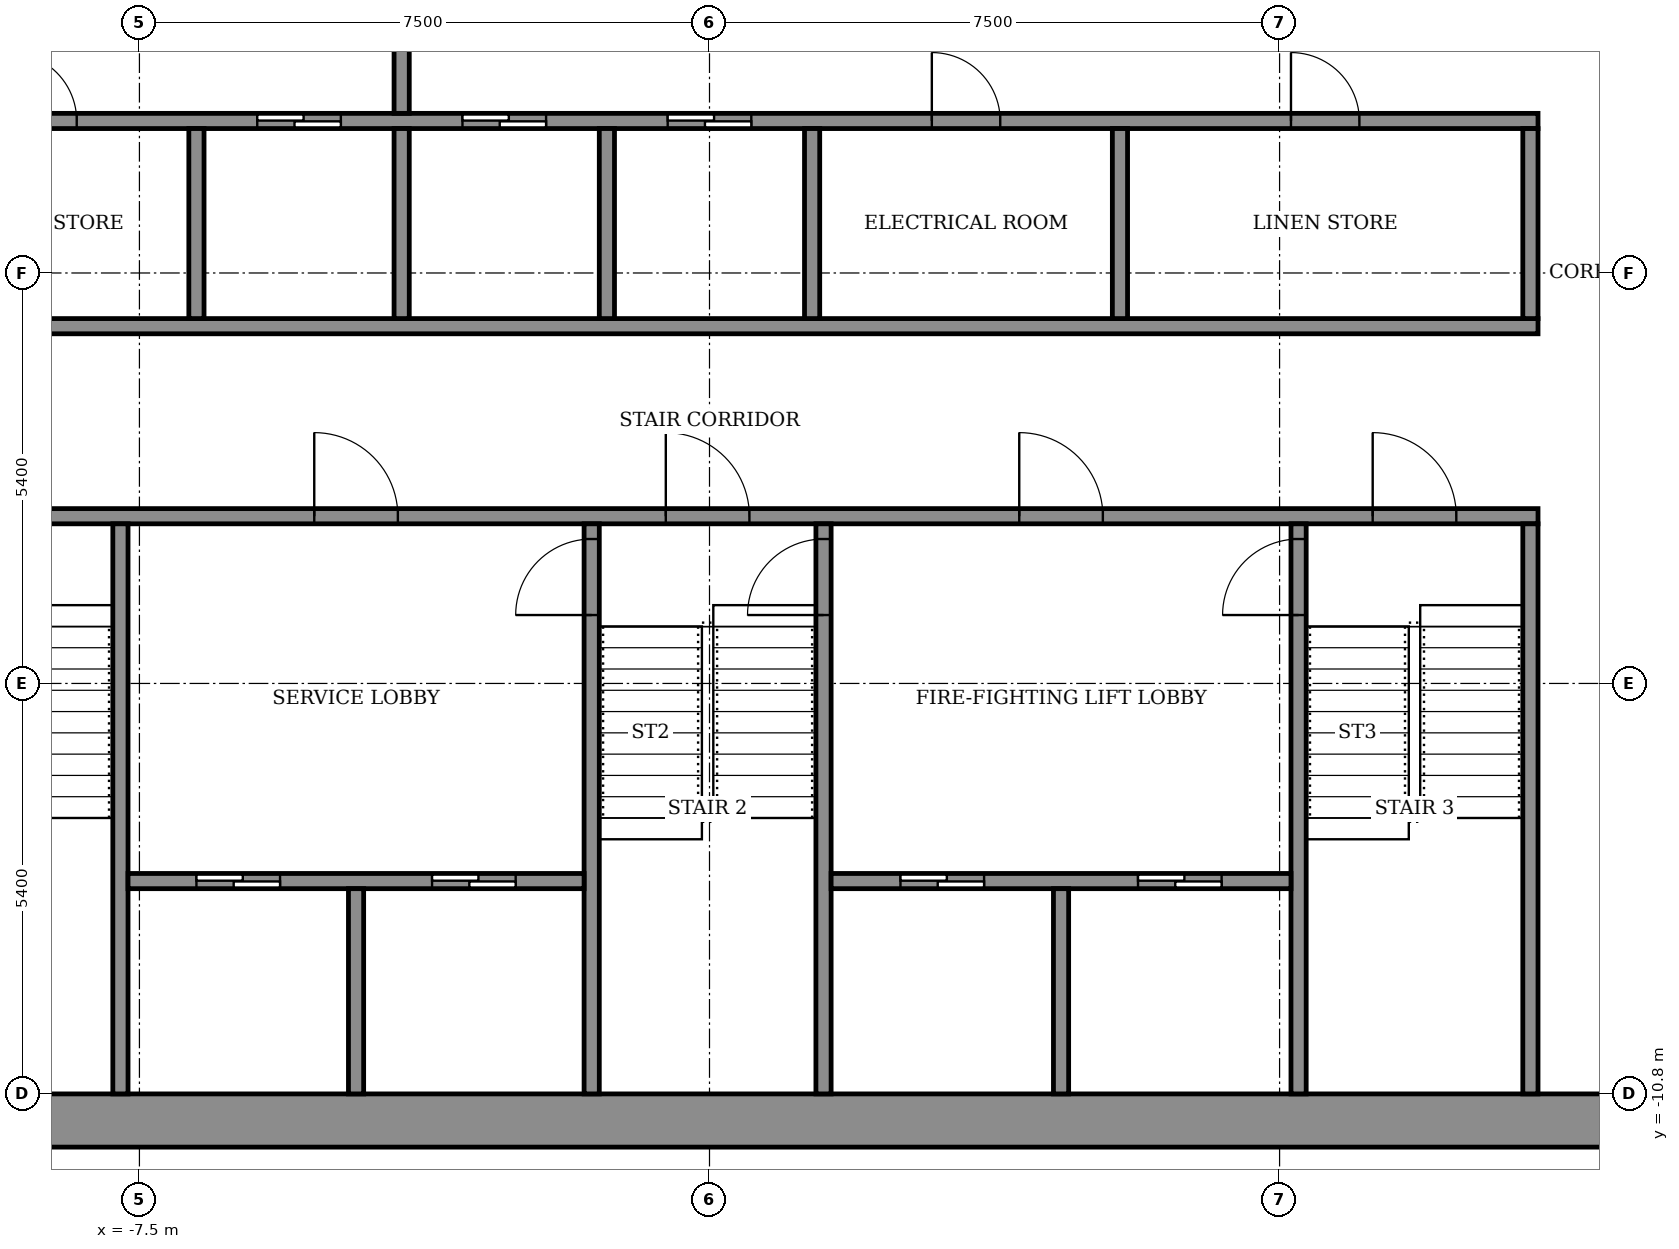
"""IFC4 building model, lengths in metres.
Left out: names, types, materials, properties, quantities, classifications, styles, units other than length and angle.
Written with IfcOpenShell. Run it as: python <this file> out.ifc"""

import sys

from ifc_helpers import new_model, si_unit, direction, frame, frame_2d, origin, place, context, subcontext, project, spatial, rectangle, extrude, element, fill, save


model = new_model("IFC4")
c1 = context("Model", 3, precision=1e-05, world=origin(), true_north=direction((0.0, 1.0)))
c2 = subcontext(c1, "Body", "Model", "MODEL_VIEW")
j1 = project(units=[si_unit("LENGTHUNIT", "METRE"), si_unit("PLANEANGLEUNIT", "RADIAN")], contexts=[c1])
p1 = place(None, origin())
s1 = spatial("IfcSite", under=j1, at=p1, CompositionType="ELEMENT")
p2 = place(p1, origin())
s2 = spatial("IfcBuilding", under=s1, at=p2, CompositionType="ELEMENT")
p3 = place(p2, frame((0.0, 0.0, 268.1)))
s3 = spatial("IfcBuildingStorey", under=s2, at=p3, CompositionType="ELEMENT", Elevation=268.1)
p4 = place(p3, frame((-14.5, -11.15, 0.0), z_axis=(0.0, 0.0, 1.0), x_axis=(1.0, 0.0, 0.0)))
e1 = element("IfcWall", 1, at=p4, inside=s3, PredefinedType="SHEAR", context=c2, shape_type="SweptSolid", body=[
    extrude(rectangle(XDim=29.0, YDim=0.7, at=frame_2d((14.5, 0.0))), origin(), (0.0, 0.0, 1.0), 3.6),
])
p5 = place(p3, frame((-10.9, -3.2, 0.0), z_axis=(0.0, 0.0, 1.0), x_axis=(1.0, 0.0, 0.0)))
e2 = element("IfcWall", 2, at=p5, inside=s3, PredefinedType="SHEAR", context=c2, shape_type="SweptSolid", body=[
    extrude(rectangle(XDim=21.8, YDim=0.2, at=frame_2d((10.9, 0.0))), origin(), (0.0, 0.0, 1.0), 3.05),
])
p6 = place(p5, frame((1.075, 0.0, 0.0)))
e3 = element("IfcOpeningElement", 3, at=p6, cuts=e2, PredefinedType="OPENING", context=c2, shape_type="SweptSolid", body=[
    extrude(rectangle(XDim=1.1, YDim=2.1, at=frame_2d((0.55, 1.05))), frame((0.0, 0.11, 0.0), z_axis=(0.0, -1.0, 0.0), x_axis=(1.0, 0.0, 0.0)), (0.0, 0.0, 1.0), 0.22),
])
p7 = place(p5, frame((10.325, 0.0, 0.0)))
e4 = element("IfcOpeningElement", 4, at=p7, cuts=e2, PredefinedType="OPENING", context=c2, shape_type="SweptSolid", body=[
    extrude(rectangle(XDim=1.1, YDim=2.1, at=frame_2d((0.55, 1.05))), frame((0.0, 0.11, 0.0), z_axis=(0.0, -1.0, 0.0), x_axis=(1.0, 0.0, 0.0)), (0.0, 0.0, 1.0), 0.22),
])
p8 = place(p5, frame((19.625, 0.0, 0.0)))
e5 = element("IfcOpeningElement", 5, at=p8, cuts=e2, PredefinedType="OPENING", context=c2, shape_type="SweptSolid", body=[
    extrude(rectangle(XDim=1.1, YDim=2.1, at=frame_2d((0.55, 1.05))), frame((0.0, 0.11, 0.0), z_axis=(0.0, -1.0, 0.0), x_axis=(1.0, 0.0, 0.0)), (0.0, 0.0, 1.0), 0.22),
])
p9 = place(p5, frame((5.7, 0.0, 0.0)))
e6 = element("IfcOpeningElement", 6, at=p9, cuts=e2, PredefinedType="OPENING", context=c2, shape_type="SweptSolid", body=[
    extrude(rectangle(XDim=1.1, YDim=2.1, at=frame_2d((0.55, 1.05))), frame((0.0, 0.11, 0.0), z_axis=(0.0, -1.0, 0.0), x_axis=(1.0, 0.0, 0.0)), (0.0, 0.0, 1.0), 0.22),
])
p10 = place(p5, frame((14.975, 0.0, 0.0)))
e7 = element("IfcOpeningElement", 7, at=p10, cuts=e2, PredefinedType="OPENING", context=c2, shape_type="SweptSolid", body=[
    extrude(rectangle(XDim=1.1, YDim=2.1, at=frame_2d((0.55, 1.05))), frame((0.0, 0.11, 0.0), z_axis=(0.0, -1.0, 0.0), x_axis=(1.0, 0.0, 0.0)), (0.0, 0.0, 1.0), 0.22),
])
p11 = place(p3, frame((-10.9, -0.7, 0.0), z_axis=(0.0, 0.0, 1.0), x_axis=(1.0, 0.0, 0.0)))
e8 = element("IfcWall", 8, at=p11, inside=s3, PredefinedType="SHEAR", context=c2, shape_type="SweptSolid", body=[
    extrude(rectangle(XDim=21.8, YDim=0.2, at=frame_2d((10.9, 0.0))), origin(), (0.0, 0.0, 1.0), 3.05),
])
p12 = place(p3, frame((-10.9, 2.0, 0.0), z_axis=(0.0, 0.0, 1.0), x_axis=(1.0, 0.0, 0.0)))
e9 = element("IfcWall", 9, at=p12, inside=s3, PredefinedType="SHEAR", context=c2, shape_type="SweptSolid", body=[
    extrude(rectangle(XDim=21.8, YDim=0.2, at=frame_2d((10.9, 0.0))), origin(), (0.0, 0.0, 1.0), 3.05),
])
p13 = place(p12, frame((4.95, 0.0, 0.0)))
e10 = element("IfcOpeningElement", 10, at=p13, cuts=e9, PredefinedType="OPENING", context=c2, shape_type="SweptSolid", body=[
    extrude(rectangle(XDim=1.1, YDim=2.1, at=frame_2d((0.55, 1.05))), frame((0.0, 0.11, 0.0), z_axis=(0.0, -1.0, 0.0), x_axis=(1.0, 0.0, 0.0)), (0.0, 0.0, 1.0), 0.22),
])
p14 = place(p12, frame((7.65, 0.0, 0.0)))
e11 = element("IfcOpeningElement", 11, at=p14, cuts=e9, PredefinedType="OPENING", context=c2, shape_type="SweptSolid", body=[
    extrude(rectangle(XDim=1.1, YDim=2.1, at=frame_2d((0.55, 1.05))), frame((0.0, 0.11, 0.0), z_axis=(0.0, -1.0, 0.0), x_axis=(1.0, 0.0, 0.0)), (0.0, 0.0, 1.0), 0.22),
])
p15 = place(p12, frame((10.35, 0.0, 0.0)))
e12 = element("IfcOpeningElement", 12, at=p15, cuts=e9, PredefinedType="OPENING", context=c2, shape_type="SweptSolid", body=[
    extrude(rectangle(XDim=1.1, YDim=2.1, at=frame_2d((0.55, 1.05))), frame((0.0, 0.11, 0.0), z_axis=(0.0, -1.0, 0.0), x_axis=(1.0, 0.0, 0.0)), (0.0, 0.0, 1.0), 0.22),
])
p16 = place(p12, frame((1.675, 0.0, 0.0)))
e13 = element("IfcOpeningElement", 13, at=p16, cuts=e9, PredefinedType="OPENING", context=c2, shape_type="SweptSolid", body=[
    extrude(rectangle(XDim=0.9, YDim=2.1, at=frame_2d((0.45, 1.05))), frame((0.0, 0.11, 0.0), z_axis=(0.0, -1.0, 0.0), x_axis=(1.0, 0.0, 0.0)), (0.0, 0.0, 1.0), 0.22),
])
p17 = place(p12, frame((13.825, 0.0, 0.0)))
e14 = element("IfcOpeningElement", 14, at=p17, cuts=e9, PredefinedType="OPENING", context=c2, shape_type="SweptSolid", body=[
    extrude(rectangle(XDim=0.9, YDim=2.1, at=frame_2d((0.45, 1.05))), frame((0.0, 0.11, 0.0), z_axis=(0.0, -1.0, 0.0), x_axis=(1.0, 0.0, 0.0)), (0.0, 0.0, 1.0), 0.22),
])
p18 = place(p12, frame((18.55, 0.0, 0.0)))
e15 = element("IfcOpeningElement", 15, at=p18, cuts=e9, PredefinedType="OPENING", context=c2, shape_type="SweptSolid", body=[
    extrude(rectangle(XDim=0.9, YDim=2.1, at=frame_2d((0.45, 1.05))), frame((0.0, 0.11, 0.0), z_axis=(0.0, -1.0, 0.0), x_axis=(1.0, 0.0, 0.0)), (0.0, 0.0, 1.0), 0.22),
])
p19 = place(p3, frame((-7.75, -10.8, 0.0), z_axis=(0.0, 0.0, 1.0), x_axis=(0.0, 1.0, 0.0)))
e16 = element("IfcWall", 16, at=p19, inside=s3, PredefinedType="SHEAR", context=c2, shape_type="SweptSolid", body=[
    extrude(rectangle(XDim=7.5, YDim=0.2, at=frame_2d((3.75, 0.0))), origin(), (0.0, 0.0, 1.0), 3.05),
])
p20 = place(p3, frame((-1.55, -10.8, 0.0), z_axis=(0.0, 0.0, 1.0), x_axis=(0.0, 1.0, 0.0)))
e17 = element("IfcWall", 17, at=p20, inside=s3, PredefinedType="SHEAR", context=c2, shape_type="SweptSolid", body=[
    extrude(rectangle(XDim=7.5, YDim=0.2, at=frame_2d((3.75, 0.0))), origin(), (0.0, 0.0, 1.0), 3.05),
])
p21 = place(p20, frame((6.3, 0.0, 0.0)))
e18 = element("IfcOpeningElement", 18, at=p21, cuts=e17, PredefinedType="OPENING", context=c2, shape_type="SweptSolid", body=[
    extrude(rectangle(XDim=1.0, YDim=2.1, at=frame_2d((0.5, 1.05))), frame((0.0, 0.11, 0.0), z_axis=(0.0, -1.0, 0.0), x_axis=(1.0, 0.0, 0.0)), (0.0, 0.0, 1.0), 0.22),
])
p22 = place(p3, frame((1.5, -10.8, 0.0), z_axis=(0.0, 0.0, 1.0), x_axis=(0.0, 1.0, 0.0)))
e19 = element("IfcWall", 19, at=p22, inside=s3, PredefinedType="SHEAR", context=c2, shape_type="SweptSolid", body=[
    extrude(rectangle(XDim=7.5, YDim=0.2, at=frame_2d((3.75, 0.0))), origin(), (0.0, 0.0, 1.0), 3.05),
])
p23 = place(p22, frame((6.3, 0.0, 0.0)))
e20 = element("IfcOpeningElement", 20, at=p23, cuts=e19, PredefinedType="OPENING", context=c2, shape_type="SweptSolid", body=[
    extrude(rectangle(XDim=1.0, YDim=2.1, at=frame_2d((0.5, 1.05))), frame((0.0, 0.11, 0.0), z_axis=(0.0, -1.0, 0.0), x_axis=(1.0, 0.0, 0.0)), (0.0, 0.0, 1.0), 0.22),
])
p24 = place(p3, frame((7.75, -10.8, 0.0), z_axis=(0.0, 0.0, 1.0), x_axis=(0.0, 1.0, 0.0)))
e21 = element("IfcWall", 21, at=p24, inside=s3, PredefinedType="SHEAR", context=c2, shape_type="SweptSolid", body=[
    extrude(rectangle(XDim=7.5, YDim=0.2, at=frame_2d((3.75, 0.0))), origin(), (0.0, 0.0, 1.0), 3.05),
])
p25 = place(p24, frame((6.3, 0.0, 0.0)))
e22 = element("IfcOpeningElement", 22, at=p25, cuts=e21, PredefinedType="OPENING", context=c2, shape_type="SweptSolid", body=[
    extrude(rectangle(XDim=1.0, YDim=2.1, at=frame_2d((0.5, 1.05))), frame((0.0, 0.11, 0.0), z_axis=(0.0, -1.0, 0.0), x_axis=(1.0, 0.0, 0.0)), (0.0, 0.0, 1.0), 0.22),
])
p26 = place(p3, frame((10.8, -10.8, 0.0), z_axis=(0.0, 0.0, 1.0), x_axis=(0.0, 1.0, 0.0)))
e23 = element("IfcWall", 23, at=p26, inside=s3, PredefinedType="SHEAR", context=c2, shape_type="SweptSolid", body=[
    extrude(rectangle(XDim=7.5, YDim=0.2, at=frame_2d((3.75, 0.0))), origin(), (0.0, 0.0, 1.0), 3.05),
])
p27 = place(p3, frame((-7.65, -8.0, 0.0), z_axis=(0.0, 0.0, 1.0), x_axis=(1.0, 0.0, 0.0)))
e24 = element("IfcWall", 24, at=p27, inside=s3, PredefinedType="SHEAR", context=c2, shape_type="SweptSolid", body=[
    extrude(rectangle(XDim=6.0, YDim=0.2, at=frame_2d((3.0, 0.0))), origin(), (0.0, 0.0, 1.0), 3.05),
])
p28 = place(p27, frame((0.9, 0.0, 0.0)))
e25 = element("IfcOpeningElement", 25, at=p28, cuts=e24, PredefinedType="OPENING", context=c2, shape_type="SweptSolid", body=[
    extrude(rectangle(XDim=1.1, YDim=2.1, at=frame_2d((0.55, 1.05))), frame((0.0, 0.11, 0.0), z_axis=(0.0, -1.0, 0.0), x_axis=(1.0, 0.0, 0.0)), (0.0, 0.0, 1.0), 0.22),
])
p29 = place(p27, frame((4.0, 0.0, 0.0)))
e26 = element("IfcOpeningElement", 26, at=p29, cuts=e24, PredefinedType="OPENING", context=c2, shape_type="SweptSolid", body=[
    extrude(rectangle(XDim=1.1, YDim=2.1, at=frame_2d((0.55, 1.05))), frame((0.0, 0.11, 0.0), z_axis=(0.0, -1.0, 0.0), x_axis=(1.0, 0.0, 0.0)), (0.0, 0.0, 1.0), 0.22),
])
p30 = place(p3, frame((-4.65, -10.8, 0.0), z_axis=(0.0, 0.0, 1.0), x_axis=(0.0, 1.0, 0.0)))
e27 = element("IfcWall", 27, at=p30, inside=s3, PredefinedType="SHEAR", context=c2, shape_type="SweptSolid", body=[
    extrude(rectangle(XDim=2.7, YDim=0.2, at=frame_2d((1.35, 0.0))), origin(), (0.0, 0.0, 1.0), 3.05),
])
p31 = place(p3, frame((1.6, -8.0, 0.0), z_axis=(0.0, 0.0, 1.0), x_axis=(1.0, 0.0, 0.0)))
e28 = element("IfcWall", 28, at=p31, inside=s3, PredefinedType="SHEAR", context=c2, shape_type="SweptSolid", body=[
    extrude(rectangle(XDim=6.05, YDim=0.2, at=frame_2d((3.025, 0.0))), origin(), (0.0, 0.0, 1.0), 3.05),
])
p32 = place(p31, frame((0.913, 0.0, 0.0)))
e29 = element("IfcOpeningElement", 29, at=p32, cuts=e28, PredefinedType="OPENING", context=c2, shape_type="SweptSolid", body=[
    extrude(rectangle(XDim=1.1, YDim=2.1, at=frame_2d((0.55, 1.05))), frame((0.0, 0.11, 0.0), z_axis=(0.0, -1.0, 0.0), x_axis=(1.0, 0.0, 0.0)), (0.0, 0.0, 1.0), 0.22),
])
p33 = place(p31, frame((4.038, 0.0, 0.0)))
e30 = element("IfcOpeningElement", 30, at=p33, cuts=e28, PredefinedType="OPENING", context=c2, shape_type="SweptSolid", body=[
    extrude(rectangle(XDim=1.1, YDim=2.1, at=frame_2d((0.55, 1.05))), frame((0.0, 0.11, 0.0), z_axis=(0.0, -1.0, 0.0), x_axis=(1.0, 0.0, 0.0)), (0.0, 0.0, 1.0), 0.22),
])
p34 = place(p3, frame((4.625, -10.8, 0.0), z_axis=(0.0, 0.0, 1.0), x_axis=(0.0, 1.0, 0.0)))
e31 = element("IfcWall", 31, at=p34, inside=s3, PredefinedType="SHEAR", context=c2, shape_type="SweptSolid", body=[
    extrude(rectangle(XDim=2.7, YDim=0.2, at=frame_2d((1.35, 0.0))), origin(), (0.0, 0.0, 1.0), 3.05),
])
for number, where, z_axis, x_axis in (
    (32, (-6.75, -0.6, 0.0), (0.0, 0.0, 1.0), (0.0, 1.0, 0.0)),
    (33, (-4.05, -0.6, 0.0), (0.0, 0.0, 1.0), (0.0, 1.0, 0.0)),
    (34, (-1.35, -0.6, 0.0), (0.0, 0.0, 1.0), (0.0, 1.0, 0.0)),
    (35, (1.35, -0.6, 0.0), (0.0, 0.0, 1.0), (0.0, 1.0, 0.0)),
):
    element("IfcWall", number, at=place(p3, frame(where, z_axis=z_axis, x_axis=x_axis)), inside=s3, PredefinedType="SHEAR", context=c2, shape_type="SweptSolid", body=[
        extrude(rectangle(XDim=2.5, YDim=0.2, at=frame_2d((1.25, 0.0))), origin(), (0.0, 0.0, 1.0), 3.05),
    ])
for number, where, z_axis, x_axis in (
    (36, (5.4, -0.6, 0.0), (0.0, 0.0, 1.0), (0.0, 1.0, 0.0)),
    (37, (10.8, -0.6, 0.0), (0.0, 0.0, 1.0), (0.0, 1.0, 0.0)),
):
    element("IfcWall", number, at=place(p3, frame(where, z_axis=z_axis, x_axis=x_axis)), inside=s3, PredefinedType="STANDARD", context=c2, shape_type="SweptSolid", body=[
        extrude(rectangle(XDim=2.5, YDim=0.2, at=frame_2d((1.25, 0.0))), origin(), (0.0, 0.0, 1.0), 3.05),
    ])
p35 = place(p3, frame((-4.05, 2.1, 0.0), z_axis=(0.0, 0.0, 1.0), x_axis=(0.0, 1.0, 0.0)))
e38 = element("IfcWall", 38, at=p35, inside=s3, PredefinedType="STANDARD", context=c2, shape_type="SweptSolid", body=[
    extrude(rectangle(XDim=5.9, YDim=0.2, at=frame_2d((2.95, 0.0))), origin(), (0.0, 0.0, 1.0), 3.05),
])
p36 = place(p35, frame((2.35, 0.0, 0.0)))
e39 = element("IfcOpeningElement", 39, at=p36, cuts=e38, PredefinedType="OPENING", context=c2, shape_type="SweptSolid", body=[
    extrude(rectangle(XDim=1.2, YDim=2.1, at=frame_2d((0.6, 1.05))), frame((0.0, 0.11, 0.0), z_axis=(0.0, -1.0, 0.0), x_axis=(1.0, 0.0, 0.0)), (0.0, 0.0, 1.0), 0.22),
])
p37 = place(p13, origin())
e40 = element("IfcDoor", 40, at=p37, inside=s3, OperationType="SLIDING_TO_LEFT", PredefinedType="DOOR", context=c2, shape_type="SweptSolid", body=[
    extrude(rectangle(XDim=1.1, YDim=2.1, at=frame_2d((0.55, 1.05))), frame((0.0, 0.025, 0.0), z_axis=(0.0, -1.0, 0.0), x_axis=(1.0, 0.0, 0.0)), (0.0, 0.0, 1.0), 0.05),
])
fill(e10, e40)
p38 = place(p14, origin())
e41 = element("IfcDoor", 41, at=p38, inside=s3, OperationType="SLIDING_TO_LEFT", PredefinedType="DOOR", context=c2, shape_type="SweptSolid", body=[
    extrude(rectangle(XDim=1.1, YDim=2.1, at=frame_2d((0.55, 1.05))), frame((0.0, 0.025, 0.0), z_axis=(0.0, -1.0, 0.0), x_axis=(1.0, 0.0, 0.0)), (0.0, 0.0, 1.0), 0.05),
])
fill(e11, e41)
p39 = place(p15, origin())
e42 = element("IfcDoor", 42, at=p39, inside=s3, OperationType="SLIDING_TO_LEFT", PredefinedType="DOOR", context=c2, shape_type="SweptSolid", body=[
    extrude(rectangle(XDim=1.1, YDim=2.1, at=frame_2d((0.55, 1.05))), frame((0.0, 0.025, 0.0), z_axis=(0.0, -1.0, 0.0), x_axis=(1.0, 0.0, 0.0)), (0.0, 0.0, 1.0), 0.05),
])
fill(e12, e42)
p40 = place(p16, origin())
e43 = element("IfcDoor", 43, at=p40, inside=s3, OperationType="SINGLE_SWING_RIGHT", PredefinedType="DOOR", context=c2, shape_type="SweptSolid", body=[
    extrude(rectangle(XDim=0.9, YDim=2.1, at=frame_2d((0.45, 1.05))), frame((0.0, 0.025, 0.0), z_axis=(0.0, -1.0, 0.0), x_axis=(1.0, 0.0, 0.0)), (0.0, 0.0, 1.0), 0.05),
])
fill(e13, e43)
p41 = place(p17, origin())
e44 = element("IfcDoor", 44, at=p41, inside=s3, OperationType="SINGLE_SWING_LEFT", PredefinedType="DOOR", context=c2, shape_type="SweptSolid", body=[
    extrude(rectangle(XDim=0.9, YDim=2.1, at=frame_2d((0.45, 1.05))), frame((0.0, 0.025, 0.0), z_axis=(0.0, -1.0, 0.0), x_axis=(1.0, 0.0, 0.0)), (0.0, 0.0, 1.0), 0.05),
])
fill(e14, e44)
p42 = place(p18, origin())
e45 = element("IfcDoor", 45, at=p42, inside=s3, OperationType="SINGLE_SWING_RIGHT", PredefinedType="DOOR", context=c2, shape_type="SweptSolid", body=[
    extrude(rectangle(XDim=0.9, YDim=2.1, at=frame_2d((0.45, 1.05))), frame((0.0, 0.025, 0.0), z_axis=(0.0, -1.0, 0.0), x_axis=(1.0, 0.0, 0.0)), (0.0, 0.0, 1.0), 0.05),
])
fill(e15, e45)
p43 = place(p32, origin())
e46 = element("IfcDoor", 46, at=p43, inside=s3, OperationType="SLIDING_TO_LEFT", PredefinedType="DOOR", context=c2, shape_type="SweptSolid", body=[
    extrude(rectangle(XDim=1.1, YDim=2.1, at=frame_2d((0.55, 1.05))), frame((0.0, 0.025, 0.0), z_axis=(0.0, -1.0, 0.0), x_axis=(1.0, 0.0, 0.0)), (0.0, 0.0, 1.0), 0.05),
])
fill(e29, e46)
p44 = place(p28, origin())
e47 = element("IfcDoor", 47, at=p44, inside=s3, OperationType="SLIDING_TO_LEFT", PredefinedType="DOOR", context=c2, shape_type="SweptSolid", body=[
    extrude(rectangle(XDim=1.1, YDim=2.1, at=frame_2d((0.55, 1.05))), frame((0.0, 0.025, 0.0), z_axis=(0.0, -1.0, 0.0), x_axis=(1.0, 0.0, 0.0)), (0.0, 0.0, 1.0), 0.05),
])
fill(e25, e47)
p45 = place(p33, origin())
e48 = element("IfcDoor", 48, at=p45, inside=s3, OperationType="SLIDING_TO_LEFT", PredefinedType="DOOR", context=c2, shape_type="SweptSolid", body=[
    extrude(rectangle(XDim=1.1, YDim=2.1, at=frame_2d((0.55, 1.05))), frame((0.0, 0.025, 0.0), z_axis=(0.0, -1.0, 0.0), x_axis=(1.0, 0.0, 0.0)), (0.0, 0.0, 1.0), 0.05),
])
fill(e30, e48)
p46 = place(p29, origin())
e49 = element("IfcDoor", 49, at=p46, inside=s3, OperationType="SLIDING_TO_LEFT", PredefinedType="DOOR", context=c2, shape_type="SweptSolid", body=[
    extrude(rectangle(XDim=1.1, YDim=2.1, at=frame_2d((0.55, 1.05))), frame((0.0, 0.025, 0.0), z_axis=(0.0, -1.0, 0.0), x_axis=(1.0, 0.0, 0.0)), (0.0, 0.0, 1.0), 0.05),
])
fill(e26, e49)
p47 = place(p7, origin())
e50 = element("IfcDoor", 50, at=p47, inside=s3, OperationType="SINGLE_SWING_RIGHT", PredefinedType="DOOR", context=c2, shape_type="SweptSolid", body=[
    extrude(rectangle(XDim=1.1, YDim=2.1, at=frame_2d((0.55, 1.05))), frame((0.0, 0.025, 0.0), z_axis=(0.0, -1.0, 0.0), x_axis=(1.0, 0.0, 0.0)), (0.0, 0.0, 1.0), 0.05),
])
fill(e4, e50)
p48 = place(p8, origin())
e51 = element("IfcDoor", 51, at=p48, inside=s3, OperationType="SINGLE_SWING_RIGHT", PredefinedType="DOOR", context=c2, shape_type="SweptSolid", body=[
    extrude(rectangle(XDim=1.1, YDim=2.1, at=frame_2d((0.55, 1.05))), frame((0.0, 0.025, 0.0), z_axis=(0.0, -1.0, 0.0), x_axis=(1.0, 0.0, 0.0)), (0.0, 0.0, 1.0), 0.05),
])
fill(e5, e51)
p49 = place(p9, origin())
e52 = element("IfcDoor", 52, at=p49, inside=s3, OperationType="SINGLE_SWING_LEFT", PredefinedType="DOOR", context=c2, shape_type="SweptSolid", body=[
    extrude(rectangle(XDim=1.1, YDim=2.1, at=frame_2d((0.55, 1.05))), frame((0.0, 0.025, 0.0), z_axis=(0.0, -1.0, 0.0), x_axis=(1.0, 0.0, 0.0)), (0.0, 0.0, 1.0), 0.05),
])
fill(e6, e52)
p50 = place(p10, origin())
e53 = element("IfcDoor", 53, at=p50, inside=s3, OperationType="SINGLE_SWING_LEFT", PredefinedType="DOOR", context=c2, shape_type="SweptSolid", body=[
    extrude(rectangle(XDim=1.1, YDim=2.1, at=frame_2d((0.55, 1.05))), frame((0.0, 0.025, 0.0), z_axis=(0.0, -1.0, 0.0), x_axis=(1.0, 0.0, 0.0)), (0.0, 0.0, 1.0), 0.05),
])
fill(e7, e53)
p51 = place(p21, origin())
e54 = element("IfcDoor", 54, at=p51, inside=s3, OperationType="SINGLE_SWING_RIGHT", PredefinedType="DOOR", context=c2, shape_type="SweptSolid", body=[
    extrude(rectangle(XDim=1.0, YDim=2.1, at=frame_2d((0.5, 1.05))), frame((0.0, 0.025, 0.0), z_axis=(0.0, -1.0, 0.0), x_axis=(1.0, 0.0, 0.0)), (0.0, 0.0, 1.0), 0.05),
])
fill(e18, e54)
p52 = place(p23, origin())
e55 = element("IfcDoor", 55, at=p52, inside=s3, OperationType="SINGLE_SWING_RIGHT", PredefinedType="DOOR", context=c2, shape_type="SweptSolid", body=[
    extrude(rectangle(XDim=1.0, YDim=2.1, at=frame_2d((0.5, 1.05))), frame((0.0, 0.025, 0.0), z_axis=(0.0, -1.0, 0.0), x_axis=(1.0, 0.0, 0.0)), (0.0, 0.0, 1.0), 0.05),
])
fill(e20, e55)
p53 = place(p25, origin())
e56 = element("IfcDoor", 56, at=p53, inside=s3, OperationType="SINGLE_SWING_RIGHT", PredefinedType="DOOR", context=c2, shape_type="SweptSolid", body=[
    extrude(rectangle(XDim=1.0, YDim=2.1, at=frame_2d((0.5, 1.05))), frame((0.0, 0.025, 0.0), z_axis=(0.0, -1.0, 0.0), x_axis=(1.0, 0.0, 0.0)), (0.0, 0.0, 1.0), 0.05),
])
fill(e22, e56)
save(model, sys.argv[1])
